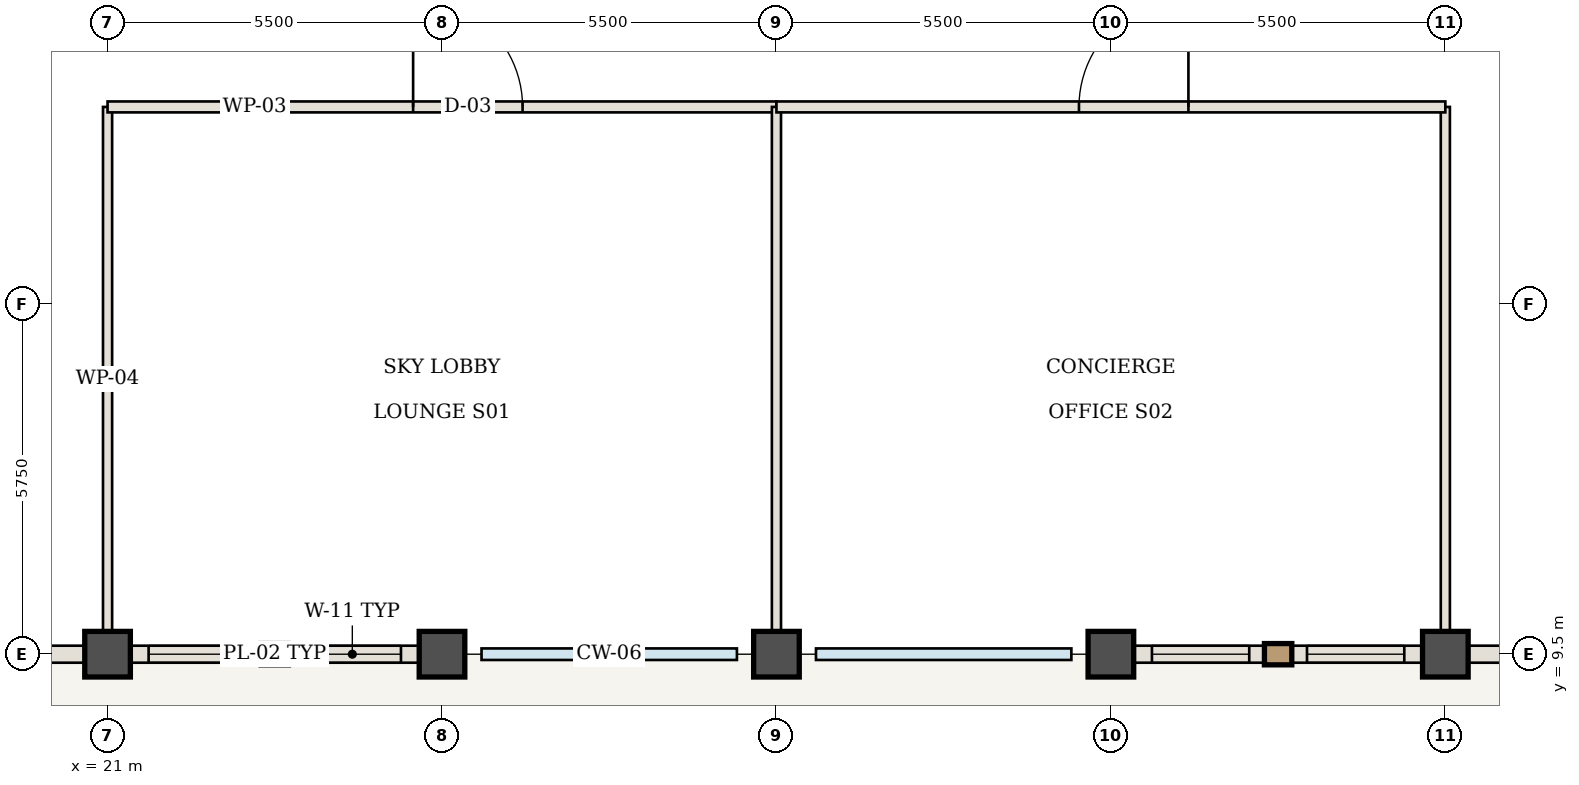
"""IFC4 building model, lengths in metres.
Left out: names, types, materials, properties, quantities, classifications, styles, units other than length and angle.
Written with IfcOpenShell. Run it as: python <this file> out.ifc"""

import sys

from ifc_helpers import new_model, si_unit, direction, frame, frame_2d, origin, origin_2d, place, context, subcontext, project, spatial, rectangle, extrude, element, fill, save


model = new_model("IFC4")
c1 = context("Model", 3, precision=1e-05, world=origin(), true_north=direction((0.0, 1.0)))
c2 = subcontext(c1, "Body", "Model", "MODEL_VIEW")
j1 = project(units=[si_unit("LENGTHUNIT", "METRE"), si_unit("PLANEANGLEUNIT", "RADIAN")], contexts=[c1])
p1 = place(None, origin())
s1 = spatial("IfcSite", under=j1, at=p1, CompositionType="ELEMENT")
p2 = place(p1, origin())
s2 = spatial("IfcBuilding", under=s1, at=p2, CompositionType="ELEMENT")
p3 = place(p2, frame((0.0, 0.0, 257.6)))
s3 = spatial("IfcBuildingStorey", under=s2, at=p3, CompositionType="ELEMENT", Elevation=257.6)
for number, where, z_axis, x_axis in (
    (1, (21.0, 9.5, -0.42), (0.0, 0.0, 1.0), (1.0, 0.0, 0.0)),
    (2, (26.5, 9.5, -0.42), (0.0, 0.0, 1.0), (1.0, 0.0, 0.0)),
    (3, (32.0, 9.5, -0.42), (0.0, 0.0, 1.0), (1.0, 0.0, 0.0)),
    (4, (37.5, 9.5, -0.42), (0.0, 0.0, 1.0), (1.0, 0.0, 0.0)),
    (5, (43.0, 9.5, -0.42), (0.0, 0.0, 1.0), (1.0, 0.0, 0.0)),
):
    element("IfcColumn", number, at=place(p3, frame(where, z_axis=z_axis, x_axis=x_axis)), inside=s3, PredefinedType="COLUMN", context=c2, shape_type="SweptSolid", body=[
        extrude(rectangle(XDim=0.75, YDim=0.75, at=origin_2d()), origin(), (0.0, 0.0, 1.0), 4.97),
    ])
for number, where, z_axis, x_axis in (
    (6, (21.0, 9.56, 0.0), (0.0, 0.0, 1.0), (0.0, 1.0, 0.0)),
    (7, (43.0, 9.56, 0.0), (0.0, 0.0, 1.0), (0.0, 1.0, 0.0)),
):
    element("IfcWall", number, at=place(p3, frame(where, z_axis=z_axis, x_axis=x_axis)), inside=s3, PredefinedType="STANDARD", context=c2, shape_type="SweptSolid", body=[
        extrude(rectangle(XDim=8.94, YDim=0.15, at=frame_2d((4.47, 0.0))), origin(), (0.0, 0.0, 1.0), 4.13),
    ])
p4 = place(p3, frame((21.0, 18.5, 0.0), z_axis=(0.0, 0.0, 1.0), x_axis=(1.0, 0.0, 0.0)))
e8 = element("IfcWall", 8, at=p4, inside=s3, PredefinedType="STANDARD", context=c2, shape_type="SweptSolid", body=[
    extrude(rectangle(XDim=11.0, YDim=0.18, at=frame_2d((5.5, 0.0))), origin(), (0.0, 0.0, 1.0), 4.13),
])
p5 = place(p4, frame((5.025, 0.0, 0.0)))
e9 = element("IfcOpeningElement", 9, at=p5, cuts=e8, PredefinedType="OPENING", context=c2, shape_type="SweptSolid", body=[
    extrude(rectangle(XDim=1.8, YDim=2.35, at=frame_2d((0.9, 1.175))), frame((0.0, 0.1, 0.0), z_axis=(0.0, -1.0, 0.0), x_axis=(1.0, 0.0, 0.0)), (0.0, 0.0, 1.0), 0.2),
])
p6 = place(p3, frame((32.0, 9.56, 0.0), z_axis=(0.0, 0.0, 1.0), x_axis=(0.0, 1.0, 0.0)))
e10 = element("IfcWall", 10, at=p6, inside=s3, PredefinedType="STANDARD", context=c2, shape_type="SweptSolid", body=[
    extrude(rectangle(XDim=8.94, YDim=0.15, at=frame_2d((4.47, 0.0))), origin(), (0.0, 0.0, 1.0), 3.585),
])
p7 = place(p3, frame((32.0, 18.5, 0.0), z_axis=(0.0, 0.0, 1.0), x_axis=(1.0, 0.0, 0.0)))
e11 = element("IfcWall", 11, at=p7, inside=s3, PredefinedType="STANDARD", context=c2, shape_type="SweptSolid", body=[
    extrude(rectangle(XDim=11.0, YDim=0.18, at=frame_2d((5.5, 0.0))), origin(), (0.0, 0.0, 1.0), 4.13),
])
p8 = place(p7, frame((4.975, 0.0, 0.0)))
e12 = element("IfcOpeningElement", 12, at=p8, cuts=e11, PredefinedType="OPENING", context=c2, shape_type="SweptSolid", body=[
    extrude(rectangle(XDim=1.8, YDim=2.35, at=frame_2d((0.9, 1.175))), frame((0.0, 0.1, 0.0), z_axis=(0.0, -1.0, 0.0), x_axis=(1.0, 0.0, 0.0)), (0.0, 0.0, 1.0), 0.2),
])
p9 = place(p3, frame((21.0, 9.5, 0.0), z_axis=(0.0, 0.0, 1.0), x_axis=(-1.0, 0.0, 0.0)))
e13 = element("IfcWall", 13, at=p9, inside=s3, PredefinedType="USERDEFINED", context=c2, shape_type="SweptSolid", body=[
    extrude(rectangle(XDim=5.5, YDim=0.28, at=frame_2d((2.75, 0.0))), origin(), (0.0, 0.0, 1.0), 3.43),
])
p10 = place(p3, frame((26.5, 9.5, 0.0), z_axis=(0.0, 0.0, 1.0), x_axis=(-1.0, 0.0, 0.0)))
e14 = element("IfcWall", 14, at=p10, inside=s3, PredefinedType="USERDEFINED", context=c2, shape_type="SweptSolid", body=[
    extrude(rectangle(XDim=5.5, YDim=0.28, at=frame_2d((2.75, 0.0))), origin(), (0.0, 0.0, 1.0), 3.43),
])
p11 = place(p10, frame((0.675, 0.0, 0.85)))
e15 = element("IfcOpeningElement", 15, at=p11, cuts=e14, PredefinedType="OPENING", context=c2, shape_type="SweptSolid", body=[
    extrude(rectangle(XDim=1.6, YDim=2.15, at=frame_2d((0.8, 1.075))), frame((0.0, 0.15, 0.0), z_axis=(0.0, -1.0, 0.0), x_axis=(1.0, 0.0, 0.0)), (0.0, 0.0, 1.0), 0.3),
])
p12 = place(p10, frame((3.225, 0.0, 0.85)))
e16 = element("IfcOpeningElement", 16, at=p12, cuts=e14, PredefinedType="OPENING", context=c2, shape_type="SweptSolid", body=[
    extrude(rectangle(XDim=1.6, YDim=2.15, at=frame_2d((0.8, 1.075))), frame((0.0, 0.15, 0.0), z_axis=(0.0, -1.0, 0.0), x_axis=(1.0, 0.0, 0.0)), (0.0, 0.0, 1.0), 0.3),
])
p13 = place(p3, frame((43.0, 9.5, 0.0), z_axis=(0.0, 0.0, 1.0), x_axis=(-1.0, 0.0, 0.0)))
e17 = element("IfcWall", 17, at=p13, inside=s3, PredefinedType="USERDEFINED", context=c2, shape_type="SweptSolid", body=[
    extrude(rectangle(XDim=5.5, YDim=0.28, at=frame_2d((2.75, 0.0))), origin(), (0.0, 0.0, 1.0), 3.43),
])
p14 = place(p13, frame((0.675, 0.0, 0.85)))
e18 = element("IfcOpeningElement", 18, at=p14, cuts=e17, PredefinedType="OPENING", context=c2, shape_type="SweptSolid", body=[
    extrude(rectangle(XDim=1.6, YDim=2.15, at=frame_2d((0.8, 1.075))), frame((0.0, 0.15, 0.0), z_axis=(0.0, -1.0, 0.0), x_axis=(1.0, 0.0, 0.0)), (0.0, 0.0, 1.0), 0.3),
])
p15 = place(p13, frame((3.225, 0.0, 0.85)))
e19 = element("IfcOpeningElement", 19, at=p15, cuts=e17, PredefinedType="OPENING", context=c2, shape_type="SweptSolid", body=[
    extrude(rectangle(XDim=1.6, YDim=2.15, at=frame_2d((0.8, 1.075))), frame((0.0, 0.15, 0.0), z_axis=(0.0, -1.0, 0.0), x_axis=(1.0, 0.0, 0.0)), (0.0, 0.0, 1.0), 0.3),
])
p16 = place(p3, frame((48.5, 9.5, 0.0), z_axis=(0.0, 0.0, 1.0), x_axis=(-1.0, 0.0, 0.0)))
e20 = element("IfcWall", 20, at=p16, inside=s3, PredefinedType="USERDEFINED", context=c2, shape_type="SweptSolid", body=[
    extrude(rectangle(XDim=5.5, YDim=0.28, at=frame_2d((2.75, 0.0))), origin(), (0.0, 0.0, 1.0), 3.43),
])
p17 = place(p5, origin())
e21 = element("IfcDoor", 21, at=p17, inside=s3, OperationType="SINGLE_SWING_LEFT", PredefinedType="DOOR", context=c2, shape_type="SweptSolid", body=[
    extrude(rectangle(XDim=1.8, YDim=2.35, at=frame_2d((0.9, 1.175))), frame((0.0, 0.025, 0.0), z_axis=(0.0, -1.0, 0.0), x_axis=(1.0, 0.0, 0.0)), (0.0, 0.0, 1.0), 0.05),
])
fill(e9, e21)
p18 = place(p8, origin())
e22 = element("IfcDoor", 22, at=p18, inside=s3, OperationType="SINGLE_SWING_RIGHT", PredefinedType="DOOR", context=c2, shape_type="SweptSolid", body=[
    extrude(rectangle(XDim=1.8, YDim=2.35, at=frame_2d((0.9, 1.175))), frame((0.0, 0.025, 0.0), z_axis=(0.0, -1.0, 0.0), x_axis=(1.0, 0.0, 0.0)), (0.0, 0.0, 1.0), 0.05),
])
fill(e12, e22)
p19 = place(p11, origin())
e23 = element("IfcWindow", 23, at=p19, inside=s3, PartitioningType="SINGLE_PANEL", PredefinedType="WINDOW", context=c2, shape_type="SweptSolid", body=[
    extrude(rectangle(XDim=1.6, YDim=2.15, at=frame_2d((0.8, 1.075))), frame((0.0, 0.03, 0.0), z_axis=(0.0, -1.0, 0.0), x_axis=(1.0, 0.0, 0.0)), (0.0, 0.0, 1.0), 0.06),
])
fill(e15, e23)
p20 = place(p12, origin())
e24 = element("IfcWindow", 24, at=p20, inside=s3, PartitioningType="SINGLE_PANEL", PredefinedType="WINDOW", context=c2, shape_type="SweptSolid", body=[
    extrude(rectangle(XDim=1.6, YDim=2.15, at=frame_2d((0.8, 1.075))), frame((0.0, 0.03, 0.0), z_axis=(0.0, -1.0, 0.0), x_axis=(1.0, 0.0, 0.0)), (0.0, 0.0, 1.0), 0.06),
])
fill(e16, e24)
p21 = place(p14, origin())
e25 = element("IfcWindow", 25, at=p21, inside=s3, PartitioningType="SINGLE_PANEL", PredefinedType="WINDOW", context=c2, shape_type="SweptSolid", body=[
    extrude(rectangle(XDim=1.6, YDim=2.15, at=frame_2d((0.8, 1.075))), frame((0.0, 0.03, 0.0), z_axis=(0.0, -1.0, 0.0), x_axis=(1.0, 0.0, 0.0)), (0.0, 0.0, 1.0), 0.06),
])
fill(e18, e25)
p22 = place(p15, origin())
e26 = element("IfcWindow", 26, at=p22, inside=s3, PartitioningType="SINGLE_PANEL", PredefinedType="WINDOW", context=c2, shape_type="SweptSolid", body=[
    extrude(rectangle(XDim=1.6, YDim=2.15, at=frame_2d((0.8, 1.075))), frame((0.0, 0.03, 0.0), z_axis=(0.0, -1.0, 0.0), x_axis=(1.0, 0.0, 0.0)), (0.0, 0.0, 1.0), 0.06),
])
fill(e19, e26)
save(model, sys.argv[1])
